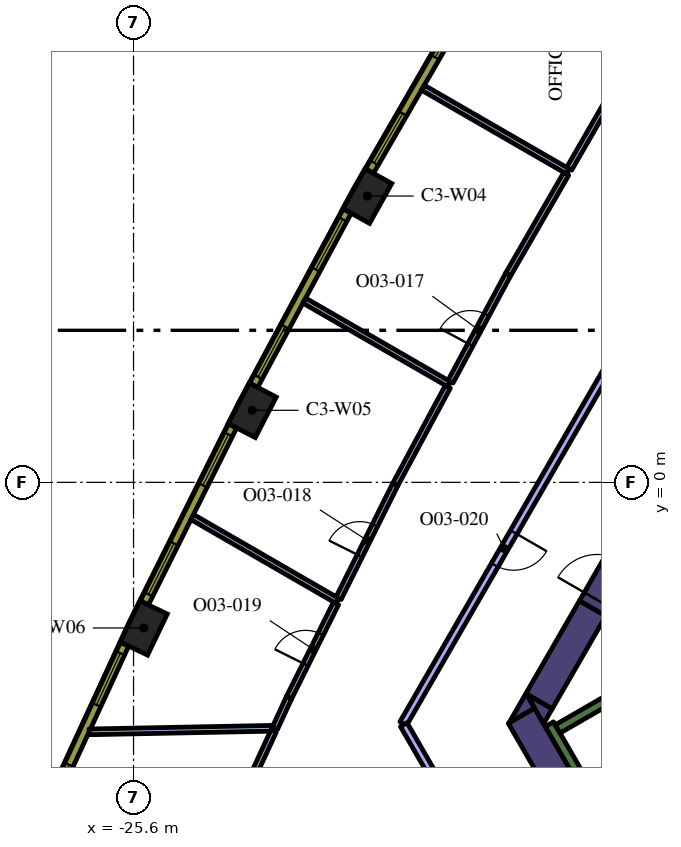
"""IFC4 building model, lengths in metres.
Left out: names, types, materials, properties, quantities, classifications, styles, units other than length and angle.
Written with IfcOpenShell. Run it as: python <this file> out.ifc"""

import sys

from ifc_helpers import new_model, si_unit, direction, frame, frame_2d, origin, origin_2d, place, context, subcontext, project, spatial, polyline, rectangle, outline, extrude, element, fill, save


model = new_model("IFC4")
c1 = context("Model", 3, precision=1e-05, world=origin(), true_north=direction((0.0, 1.0)))
c2 = subcontext(c1, "Body", "Model", "MODEL_VIEW")
j1 = project(units=[si_unit("LENGTHUNIT", "METRE"), si_unit("PLANEANGLEUNIT", "RADIAN")], contexts=[c1])
p1 = place(None, origin())
s1 = spatial("IfcSite", under=j1, at=p1, CompositionType="ELEMENT")
p2 = place(p1, origin())
s2 = spatial("IfcBuilding", under=s1, at=p2, CompositionType="ELEMENT")
p3 = place(p2, frame((0.0, 0.0, 171.0)))
s3 = spatial("IfcBuildingStorey", under=s2, at=p3, CompositionType="ELEMENT", Elevation=171.0)
for number, where, z_axis, x_axis in (
    (1, (-19.447, 7.533, 0.0), (0.0, 0.0, 1.0), (-0.487, -0.874, 0.0)),
    (2, (-22.476, 1.896, 0.0), (0.0, 0.0, 1.0), (-0.46, -0.888, 0.0)),
    (3, (-25.332, -3.832, 0.0), (0.0, 0.0, 1.0), (-0.433, -0.902, 0.0)),
):
    element("IfcColumn", number, at=place(p3, frame(where, z_axis=z_axis, x_axis=x_axis)), inside=s3, PredefinedType="COLUMN", context=c2, shape_type="SweptSolid", body=[
        extrude(rectangle(XDim=1.2, YDim=0.8, at=origin_2d()), origin(), (0.0, 0.0, 1.0), 4.2),
    ])
p4 = place(p3, frame((-15.392, -6.14, 0.0), z_axis=(0.0, 0.0, 1.0), x_axis=(0.499984020225, -0.866034629516, 0.0)))
e4 = element("IfcWall", 4, at=p4, inside=s3, PredefinedType="SOLIDWALL", context=c2, shape_type="SweptSolid", body=[
    extrude(rectangle(XDim=3.824, YDim=0.8, at=frame_2d((1.912, 0.0))), origin(), (0.0, 0.0, 1.0), 4.2),
])
p5 = place(p3, origin())
e5 = element("IfcWall", 5, at=p5, inside=s3, PredefinedType="SOLIDWALL", context=c2, shape_type="SweptSolid", body=[
    extrude(outline(polyline([(-15.047, -5.938), (-15.719, -6.326), (-15.271, -5.55), (-15.047, -5.938)])), origin(), (0.0, 0.0, 1.0), 4.2),
])
p6 = place(p3, frame((-13.518, -3.314, 0.0), z_axis=(0.0, 0.0, 1.0), x_axis=(-0.499969377405, -0.866043083026, 0.0)))
e6 = element("IfcWall", 6, at=p6, inside=s3, PredefinedType="SOLIDWALL", context=c2, shape_type="SweptSolid", body=[
    extrude(rectangle(XDim=2.824, YDim=0.8, at=frame_2d((1.412, 0.0))), origin(), (0.0, 0.0, 1.0), 4.2),
])
e7 = element("IfcWall", 7, at=p5, inside=s3, PredefinedType="SOLIDWALL", context=c2, shape_type="SweptSolid", body=[
    extrude(outline(polyline([(-14.809, -6.35), (-15.257, -5.574), (-14.585, -5.962), (-14.809, -6.35)])), origin(), (0.0, 0.0, 1.0), 4.2),
])
p7 = place(p3, frame((-12.84, -9.511, 0.0), z_axis=(0.0, 0.0, 1.0), x_axis=(-0.499997733992, 0.866026712061, 0.0)))
e8 = element("IfcWall", 8, at=p7, inside=s3, PredefinedType="SOLIDWALL", context=c2, shape_type="SweptSolid", body=[
    extrude(rectangle(XDim=3.634, YDim=0.25, at=frame_2d((1.817, 0.0))), origin(), (0.0, 0.0, 1.0), 4.2),
])
p8 = place(p3, frame((-14.44, -6.49, 0.0), z_axis=(0.0, 0.0, 1.0), x_axis=(0.866022966069, 0.500004222222, 0.0)))
e9 = element("IfcWall", 9, at=p8, inside=s3, PredefinedType="SOLIDWALL", context=c2, shape_type="SweptSolid", body=[
    extrude(rectangle(XDim=6.8, YDim=0.25, at=frame_2d((3.4, 0.0))), origin(), (0.0, 0.0, 1.0), 4.2),
])
p9 = place(p3, frame((-13.518, -3.314, 0.0), z_axis=(0.0, 0.0, 1.0), x_axis=(0.500000056704, 0.866025371046, 0.0)))
e10 = element("IfcWall", 10, at=p9, inside=s3, PredefinedType="SOLIDWALL", context=c2, shape_type="SweptSolid", body=[
    extrude(rectangle(XDim=1.7, YDim=0.8, at=frame_2d((0.85, 0.0))), origin(), (0.0, 0.0, 1.0), 4.2),
])
p10 = place(p9, frame((0.25, 0.0, 0.0)))
e11 = element("IfcOpeningElement", 11, at=p10, cuts=e10, PredefinedType="OPENING", context=c2, shape_type="SweptSolid", body=[
    extrude(rectangle(XDim=1.2, YDim=2.1, at=frame_2d((0.6, 1.05))), frame((0.0, 0.41, 0.0), z_axis=(0.0, -1.0, 0.0), x_axis=(1.0, 0.0, 0.0)), (0.0, 0.0, 1.0), 0.82),
])
p11 = place(p3, frame((-14.175, 8.184, 0.0), z_axis=(0.0, 0.0, 1.0), x_axis=(-0.866032203192, 0.499988222896, 0.0)))
e12 = element("IfcWall", 12, at=p11, inside=s3, PredefinedType="PARTITIONING", context=c2, shape_type="SweptSolid", body=[
    extrude(rectangle(XDim=4.4, YDim=0.15, at=frame_2d((2.2, 0.0))), origin(), (0.0, 0.0, 1.0), 3.15),
])
p12 = place(p3, frame((-12.608, 10.899, 0.0), z_axis=(0.0, 0.0, 1.0), x_axis=(-0.499991792115, -0.866030142557, 0.0)))
e13 = element("IfcWall", 13, at=p12, inside=s3, PredefinedType="PARTITIONING", context=c2, shape_type="SweptSolid", body=[
    extrude(rectangle(XDim=3.06, YDim=0.15, at=frame_2d((1.53, 0.0))), origin(), (0.0, 0.0, 1.0), 3.15),
])
p13 = place(p3, frame((-17.295, 2.581, 0.0), z_axis=(0.0, 0.0, 1.0), x_axis=(-0.866033195618, 0.499986503906, 0.0)))
e14 = element("IfcWall", 14, at=p13, inside=s3, PredefinedType="PARTITIONING", context=c2, shape_type="SweptSolid", body=[
    extrude(rectangle(XDim=4.402, YDim=0.15, at=frame_2d((2.201, 0.0))), origin(), (0.0, 0.0, 1.0), 3.15),
])
p14 = place(p3, frame((-14.213, 8.119, 0.0), z_axis=(0.0, 0.0, 1.0), x_axis=(-0.499991792115, -0.866030142557, 0.0)))
e15 = element("IfcWall", 15, at=p14, inside=s3, PredefinedType="PARTITIONING", context=c2, shape_type="SweptSolid", body=[
    extrude(rectangle(XDim=3.06, YDim=0.15, at=frame_2d((1.53, 0.0))), origin(), (0.0, 0.0, 1.0), 3.15),
])
p15 = place(p3, frame((-17.259, 2.647, 0.0), z_axis=(0.0, 0.0, 1.0), x_axis=(0.473299711777, 0.880901460341, 0.0)))
e16 = element("IfcWall", 16, at=p15, inside=s3, PredefinedType="PARTITIONING", context=c2, shape_type="SweptSolid", body=[
    extrude(rectangle(XDim=3.203, YDim=0.15, at=frame_2d((1.602, 0.0))), origin(), (0.0, 0.0, 1.0), 3.15),
])
p16 = place(p15, frame((1.104, 0.0, 0.0)))
e17 = element("IfcOpeningElement", 17, at=p16, cuts=e16, PredefinedType="OPENING", context=c2, shape_type="SweptSolid", body=[
    extrude(rectangle(XDim=0.9, YDim=2.1, at=frame_2d((0.45, 1.05))), frame((0.0, 0.085, 0.0), z_axis=(0.0, -1.0, 0.0), x_axis=(1.0, 0.0, 0.0)), (0.0, 0.0, 1.0), 0.17),
])
p17 = place(p3, frame((-20.238, -3.117, 0.0), z_axis=(0.0, 0.0, 1.0), x_axis=(-0.866026031126, 0.499998913411, 0.0)))
e18 = element("IfcWall", 18, at=p17, inside=s3, PredefinedType="PARTITIONING", context=c2, shape_type="SweptSolid", body=[
    extrude(rectangle(XDim=4.408, YDim=0.15, at=frame_2d((2.204, 0.0))), origin(), (0.0, 0.0, 1.0), 3.15),
])
p18 = place(p3, frame((-17.33, 2.515, 0.0), z_axis=(0.0, 0.0, 1.0), x_axis=(-0.473335958085, -0.880881984595, 0.0)))
e19 = element("IfcWall", 19, at=p18, inside=s3, PredefinedType="PARTITIONING", context=c2, shape_type="SweptSolid", body=[
    extrude(rectangle(XDim=2.917, YDim=0.15, at=frame_2d((1.458, 0.0))), origin(), (0.0, 0.0, 1.0), 3.15),
])
p19 = place(p3, frame((-20.204, -3.049, 0.0), z_axis=(0.0, 0.0, 1.0), x_axis=(0.446250363478, 0.894908159029, 0.0)))
e20 = element("IfcWall", 20, at=p19, inside=s3, PredefinedType="PARTITIONING", context=c2, shape_type="SweptSolid", body=[
    extrude(rectangle(XDim=3.347, YDim=0.15, at=frame_2d((1.673, 0.0))), origin(), (0.0, 0.0, 1.0), 3.15),
])
p20 = place(p19, frame((1.247, 0.0, 0.0)))
e21 = element("IfcOpeningElement", 21, at=p20, cuts=e20, PredefinedType="OPENING", context=c2, shape_type="SweptSolid", body=[
    extrude(rectangle(XDim=0.9, YDim=2.1, at=frame_2d((0.45, 1.05))), frame((0.0, 0.085, 0.0), z_axis=(0.0, -1.0, 0.0), x_axis=(1.0, 0.0, 0.0)), (0.0, 0.0, 1.0), 0.17),
])
p21 = place(p3, frame((-21.509, -5.666, 0.0), z_axis=(0.0, 0.0, 1.0), x_axis=(0.446192228952, 0.894937145739, 0.0)))
e22 = element("IfcWall", 22, at=p21, inside=s3, PredefinedType="PARTITIONING", context=c2, shape_type="SweptSolid", body=[
    extrude(rectangle(XDim=2.774, YDim=0.15, at=frame_2d((1.387, 0.0))), origin(), (0.0, 0.0, 1.0), 3.15),
])
p22 = place(p21, frame((0.973, 0.0, 0.0)))
e23 = element("IfcOpeningElement", 23, at=p22, cuts=e22, PredefinedType="OPENING", context=c2, shape_type="SweptSolid", body=[
    extrude(rectangle(XDim=0.9, YDim=2.1, at=frame_2d((0.45, 1.05))), frame((0.0, 0.085, 0.0), z_axis=(0.0, -1.0, 0.0), x_axis=(1.0, 0.0, 0.0)), (0.0, 0.0, 1.0), 0.17),
])
p23 = place(p3, frame((-21.509, -5.666, 0.0), z_axis=(0.0, 0.0, 1.0), x_axis=(-0.4188658149, -0.908048142506, 0.0)))
e24 = element("IfcWall", 24, at=p23, inside=s3, PredefinedType="PARTITIONING", context=c2, shape_type="SweptSolid", body=[
    extrude(rectangle(XDim=0.885, YDim=0.15, at=frame_2d((0.443, 0.0))), origin(), (0.0, 0.0, 1.0), 3.15),
])
p24 = place(p3, frame((-21.963, -6.472, 0.0), z_axis=(0.0, 0.0, 1.0), x_axis=(-0.999809788098, -0.019503528505, 0.0)))
e25 = element("IfcWall", 25, at=p24, inside=s3, PredefinedType="PARTITIONING", context=c2, shape_type="SweptSolid", body=[
    extrude(rectangle(XDim=4.807, YDim=0.15, at=frame_2d((2.403, 0.0))), origin(), (0.0, 0.0, 1.0), 3.15),
])
p25 = place(p3, frame((-23.848, -10.74, 0.0), z_axis=(0.0, 0.0, 1.0), x_axis=(0.418723219841, 0.908113905392, 0.0)))
e26 = element("IfcWall", 26, at=p25, inside=s3, PredefinedType="PARTITIONING", context=c2, shape_type="SweptSolid", body=[
    extrude(rectangle(XDim=4.623, YDim=0.15, at=frame_2d((2.311, 0.0))), origin(), (0.0, 0.0, 1.0), 3.15),
])
p26 = place(p25, frame((1.9, 0.0, 0.0)))
e27 = element("IfcOpeningElement", 27, at=p26, cuts=e26, PredefinedType="OPENING", context=c2, shape_type="SweptSolid", body=[
    extrude(rectangle(XDim=0.9, YDim=2.1, at=frame_2d((0.45, 1.05))), frame((0.0, 0.085, 0.0), z_axis=(0.0, -1.0, 0.0), x_axis=(1.0, 0.0, 0.0)), (0.0, 0.0, 1.0), 0.17),
])
p27 = place(p3, frame((-13.146, 2.931, 0.0), z_axis=(0.0, 0.0, 1.0), x_axis=(-0.499997861235, -0.866026638597, 0.0)))
e28 = element("IfcWall", 28, at=p27, inside=s3, PredefinedType="PARTITIONING", context=c2, shape_type="SweptSolid", body=[
    extrude(rectangle(XDim=10.717, YDim=0.2, at=frame_2d((5.359, 0.0))), origin(), (0.0, 0.0, 1.0), 3.15),
])
p28 = place(p27, frame((4.9, 0.0, 0.0)))
e29 = element("IfcOpeningElement", 29, at=p28, cuts=e28, PredefinedType="OPENING", context=c2, shape_type="SweptSolid", body=[
    extrude(rectangle(XDim=1.0, YDim=2.1, at=frame_2d((0.5, 1.05))), frame((0.0, 0.11, 0.0), z_axis=(0.0, -1.0, 0.0), x_axis=(1.0, 0.0, 0.0)), (0.0, 0.0, 1.0), 0.22),
])
p29 = place(p3, frame((-18.489, -6.376, 0.0), z_axis=(0.0, 0.0, 1.0), x_axis=(0.499989401968, -0.866031522475, 0.0)))
e30 = element("IfcWall", 30, at=p29, inside=s3, PredefinedType="PARTITIONING", context=c2, shape_type="SweptSolid", body=[
    extrude(rectangle(XDim=6.677, YDim=0.2, at=frame_2d((3.338, 0.0))), origin(), (0.0, 0.0, 1.0), 3.15),
])
p30 = place(p3, frame((-16.789, 12.697, 0.0), z_axis=(0.0, 0.0, 1.0), x_axis=(-0.500009456303, -0.866019944116, 0.0)))
e31 = element("IfcWall", 31, at=p30, inside=s3, PredefinedType="SOLIDWALL", context=c2, shape_type="SweptSolid", body=[
    extrude(rectangle(XDim=5.204, YDim=0.24, at=frame_2d((2.602, 0.0))), origin(), (0.0, 0.0, 1.0), 3.95),
])
p31 = place(p30, frame((0.248, 0.0, 0.9)))
e32 = element("IfcOpeningElement", 32, at=p31, cuts=e31, PredefinedType="OPENING", context=c2, shape_type="SweptSolid", body=[
    extrude(rectangle(XDim=1.5, YDim=2.55, at=frame_2d((0.75, 1.275))), frame((0.0, 0.13, 0.0), z_axis=(0.0, -1.0, 0.0), x_axis=(1.0, 0.0, 0.0)), (0.0, 0.0, 1.0), 0.26),
])
p32 = place(p30, frame((3.455, 0.0, 0.9)))
e33 = element("IfcOpeningElement", 33, at=p32, cuts=e31, PredefinedType="OPENING", context=c2, shape_type="SweptSolid", body=[
    extrude(rectangle(XDim=1.5, YDim=2.55, at=frame_2d((0.75, 1.275))), frame((0.0, 0.13, 0.0), z_axis=(0.0, -1.0, 0.0), x_axis=(1.0, 0.0, 0.0)), (0.0, 0.0, 1.0), 0.26),
])
p33 = place(p3, frame((-19.977, 7.139, 0.0), z_axis=(0.0, 0.0, 1.0), x_axis=(-0.473349833294, -0.880874528704, 0.0)))
e34 = element("IfcWall", 34, at=p33, inside=s3, PredefinedType="SOLIDWALL", context=c2, shape_type="SweptSolid", body=[
    extrude(rectangle(XDim=5.204, YDim=0.24, at=frame_2d((2.602, 0.0))), origin(), (0.0, 0.0, 1.0), 3.95),
])
p34 = place(p33, frame((0.248, 0.0, 0.9)))
e35 = element("IfcOpeningElement", 35, at=p34, cuts=e34, PredefinedType="OPENING", context=c2, shape_type="SweptSolid", body=[
    extrude(rectangle(XDim=1.5, YDim=2.55, at=frame_2d((0.75, 1.275))), frame((0.0, 0.13, 0.0), z_axis=(0.0, -1.0, 0.0), x_axis=(1.0, 0.0, 0.0)), (0.0, 0.0, 1.0), 0.26),
])
p35 = place(p33, frame((3.455, 0.0, 0.9)))
e36 = element("IfcOpeningElement", 36, at=p35, cuts=e34, PredefinedType="OPENING", context=c2, shape_type="SweptSolid", body=[
    extrude(rectangle(XDim=1.5, YDim=2.55, at=frame_2d((0.75, 1.275))), frame((0.0, 0.13, 0.0), z_axis=(0.0, -1.0, 0.0), x_axis=(1.0, 0.0, 0.0)), (0.0, 0.0, 1.0), 0.26),
])
p36 = place(p3, frame((-22.994, 1.485, 0.0), z_axis=(0.0, 0.0, 1.0), x_axis=(-0.446256171312, -0.8949052629, 0.0)))
e37 = element("IfcWall", 37, at=p36, inside=s3, PredefinedType="SOLIDWALL", context=c2, shape_type="SweptSolid", body=[
    extrude(rectangle(XDim=5.203, YDim=0.24, at=frame_2d((2.602, 0.0))), origin(), (0.0, 0.0, 1.0), 3.95),
])
p37 = place(p36, frame((0.248, 0.0, 0.9)))
e38 = element("IfcOpeningElement", 38, at=p37, cuts=e37, PredefinedType="OPENING", context=c2, shape_type="SweptSolid", body=[
    extrude(rectangle(XDim=1.5, YDim=2.55, at=frame_2d((0.75, 1.275))), frame((0.0, 0.13, 0.0), z_axis=(0.0, -1.0, 0.0), x_axis=(1.0, 0.0, 0.0)), (0.0, 0.0, 1.0), 0.26),
])
p38 = place(p36, frame((3.455, 0.0, 0.9)))
e39 = element("IfcOpeningElement", 39, at=p38, cuts=e37, PredefinedType="OPENING", context=c2, shape_type="SweptSolid", body=[
    extrude(rectangle(XDim=1.5, YDim=2.55, at=frame_2d((0.75, 1.275))), frame((0.0, 0.13, 0.0), z_axis=(0.0, -1.0, 0.0), x_axis=(1.0, 0.0, 0.0)), (0.0, 0.0, 1.0), 0.26),
])
p39 = place(p3, frame((-25.837, -4.258, 0.0), z_axis=(0.0, 0.0, 1.0), x_axis=(-0.418722559465, -0.908114209885, 0.0)))
e40 = element("IfcWall", 40, at=p39, inside=s3, PredefinedType="SOLIDWALL", context=c2, shape_type="SweptSolid", body=[
    extrude(rectangle(XDim=5.213, YDim=0.24, at=frame_2d((2.606, 0.0))), origin(), (0.0, 0.0, 1.0), 3.95),
])
p40 = place(p39, frame((0.261, 0.0, 0.9)))
e41 = element("IfcOpeningElement", 41, at=p40, cuts=e40, PredefinedType="OPENING", context=c2, shape_type="SweptSolid", body=[
    extrude(rectangle(XDim=1.5, YDim=2.55, at=frame_2d((0.75, 1.275))), frame((0.0, 0.13, 0.0), z_axis=(0.0, -1.0, 0.0), x_axis=(1.0, 0.0, 0.0)), (0.0, 0.0, 1.0), 0.26),
])
p41 = place(p39, frame((3.492, 0.0, 0.9)))
e42 = element("IfcOpeningElement", 42, at=p41, cuts=e40, PredefinedType="OPENING", context=c2, shape_type="SweptSolid", body=[
    extrude(rectangle(XDim=1.5, YDim=2.55, at=frame_2d((0.75, 1.275))), frame((0.0, 0.13, 0.0), z_axis=(0.0, -1.0, 0.0), x_axis=(1.0, 0.0, 0.0)), (0.0, 0.0, 1.0), 0.26),
])
p42 = place(p10, origin())
e43 = element("IfcDoor", 43, at=p42, inside=s3, OperationType="SINGLE_SWING_LEFT", PredefinedType="DOOR", context=c2, shape_type="SweptSolid", body=[
    extrude(rectangle(XDim=1.2, YDim=2.1, at=frame_2d((0.6, 1.05))), frame((0.0, 0.025, 0.0), z_axis=(0.0, -1.0, 0.0), x_axis=(1.0, 0.0, 0.0)), (0.0, 0.0, 1.0), 0.05),
])
fill(e11, e43)
p43 = place(p16, origin())
e44 = element("IfcDoor", 44, at=p43, inside=s3, OperationType="SINGLE_SWING_LEFT", PredefinedType="DOOR", context=c2, shape_type="SweptSolid", body=[
    extrude(rectangle(XDim=0.9, YDim=2.1, at=frame_2d((0.45, 1.05))), frame((0.0, 0.025, 0.0), z_axis=(0.0, -1.0, 0.0), x_axis=(1.0, 0.0, 0.0)), (0.0, 0.0, 1.0), 0.05),
])
fill(e17, e44)
p44 = place(p20, origin())
e45 = element("IfcDoor", 45, at=p44, inside=s3, OperationType="SINGLE_SWING_RIGHT", PredefinedType="DOOR", context=c2, shape_type="SweptSolid", body=[
    extrude(rectangle(XDim=0.9, YDim=2.1, at=frame_2d((0.45, 1.05))), frame((0.0, 0.025, 0.0), z_axis=(0.0, -1.0, 0.0), x_axis=(1.0, 0.0, 0.0)), (0.0, 0.0, 1.0), 0.05),
])
fill(e21, e45)
p45 = place(p22, origin())
e46 = element("IfcDoor", 46, at=p45, inside=s3, OperationType="SINGLE_SWING_RIGHT", PredefinedType="DOOR", context=c2, shape_type="SweptSolid", body=[
    extrude(rectangle(XDim=0.9, YDim=2.1, at=frame_2d((0.45, 1.05))), frame((0.0, 0.025, 0.0), z_axis=(0.0, -1.0, 0.0), x_axis=(1.0, 0.0, 0.0)), (0.0, 0.0, 1.0), 0.05),
])
fill(e23, e46)
p46 = place(p28, origin())
e47 = element("IfcDoor", 47, at=p46, inside=s3, OperationType="SINGLE_SWING_RIGHT", PredefinedType="DOOR", context=c2, shape_type="SweptSolid", body=[
    extrude(rectangle(XDim=1.0, YDim=2.1, at=frame_2d((0.5, 1.05))), frame((0.0, 0.025, 0.0), z_axis=(0.0, -1.0, 0.0), x_axis=(1.0, 0.0, 0.0)), (0.0, 0.0, 1.0), 0.05),
])
fill(e29, e47)
p47 = place(p31, origin())
e48 = element("IfcWindow", 48, at=p47, inside=s3, PartitioningType="SINGLE_PANEL", PredefinedType="WINDOW", context=c2, shape_type="SweptSolid", body=[
    extrude(rectangle(XDim=1.5, YDim=2.55, at=frame_2d((0.75, 1.275))), frame((0.0, 0.04, 0.0), z_axis=(0.0, -1.0, 0.0), x_axis=(1.0, 0.0, 0.0)), (0.0, 0.0, 1.0), 0.06),
])
fill(e32, e48)
p48 = place(p32, origin())
e49 = element("IfcWindow", 49, at=p48, inside=s3, PartitioningType="SINGLE_PANEL", PredefinedType="WINDOW", context=c2, shape_type="SweptSolid", body=[
    extrude(rectangle(XDim=1.5, YDim=2.55, at=frame_2d((0.75, 1.275))), frame((0.0, 0.04, 0.0), z_axis=(0.0, -1.0, 0.0), x_axis=(1.0, 0.0, 0.0)), (0.0, 0.0, 1.0), 0.06),
])
fill(e33, e49)
p49 = place(p34, origin())
e50 = element("IfcWindow", 50, at=p49, inside=s3, PartitioningType="SINGLE_PANEL", PredefinedType="WINDOW", context=c2, shape_type="SweptSolid", body=[
    extrude(rectangle(XDim=1.5, YDim=2.55, at=frame_2d((0.75, 1.275))), frame((0.0, 0.04, 0.0), z_axis=(0.0, -1.0, 0.0), x_axis=(1.0, 0.0, 0.0)), (0.0, 0.0, 1.0), 0.06),
])
fill(e35, e50)
p50 = place(p35, origin())
e51 = element("IfcWindow", 51, at=p50, inside=s3, PartitioningType="SINGLE_PANEL", PredefinedType="WINDOW", context=c2, shape_type="SweptSolid", body=[
    extrude(rectangle(XDim=1.5, YDim=2.55, at=frame_2d((0.75, 1.275))), frame((0.0, 0.04, 0.0), z_axis=(0.0, -1.0, 0.0), x_axis=(1.0, 0.0, 0.0)), (0.0, 0.0, 1.0), 0.06),
])
fill(e36, e51)
p51 = place(p37, origin())
e52 = element("IfcWindow", 52, at=p51, inside=s3, PartitioningType="SINGLE_PANEL", PredefinedType="WINDOW", context=c2, shape_type="SweptSolid", body=[
    extrude(rectangle(XDim=1.5, YDim=2.55, at=frame_2d((0.75, 1.275))), frame((0.0, 0.04, 0.0), z_axis=(0.0, -1.0, 0.0), x_axis=(1.0, 0.0, 0.0)), (0.0, 0.0, 1.0), 0.06),
])
fill(e38, e52)
p52 = place(p38, origin())
e53 = element("IfcWindow", 53, at=p52, inside=s3, PartitioningType="SINGLE_PANEL", PredefinedType="WINDOW", context=c2, shape_type="SweptSolid", body=[
    extrude(rectangle(XDim=1.5, YDim=2.55, at=frame_2d((0.75, 1.275))), frame((0.0, 0.04, 0.0), z_axis=(0.0, -1.0, 0.0), x_axis=(1.0, 0.0, 0.0)), (0.0, 0.0, 1.0), 0.06),
])
fill(e39, e53)
p53 = place(p40, origin())
e54 = element("IfcWindow", 54, at=p53, inside=s3, PartitioningType="SINGLE_PANEL", PredefinedType="WINDOW", context=c2, shape_type="SweptSolid", body=[
    extrude(rectangle(XDim=1.5, YDim=2.55, at=frame_2d((0.75, 1.275))), frame((0.0, 0.04, 0.0), z_axis=(0.0, -1.0, 0.0), x_axis=(1.0, 0.0, 0.0)), (0.0, 0.0, 1.0), 0.06),
])
fill(e41, e54)
p54 = place(p41, origin())
e55 = element("IfcWindow", 55, at=p54, inside=s3, PartitioningType="SINGLE_PANEL", PredefinedType="WINDOW", context=c2, shape_type="SweptSolid", body=[
    extrude(rectangle(XDim=1.5, YDim=2.55, at=frame_2d((0.75, 1.275))), frame((0.0, 0.04, 0.0), z_axis=(0.0, -1.0, 0.0), x_axis=(1.0, 0.0, 0.0)), (0.0, 0.0, 1.0), 0.06),
])
fill(e42, e55)
save(model, sys.argv[1])
